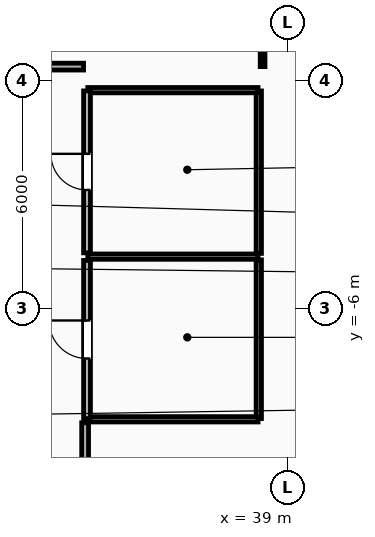
"""IFC4 building model, lengths in metres.
Left out: names, types, materials, properties, quantities, classifications, styles, units other than length and angle.
Written with IfcOpenShell. Run it as: python <this file> out.ifc"""

import sys

from ifc_helpers import new_model, si_unit, direction, frame, frame_2d, origin, place, context, subcontext, project, spatial, rectangle, extrude, element, fill, save


model = new_model("IFC4")
c1 = context("Model", 3, precision=1e-05, world=origin(), true_north=direction((0.0, 1.0)))
c2 = subcontext(c1, "Body", "Model", "MODEL_VIEW")
j1 = project(units=[si_unit("LENGTHUNIT", "METRE"), si_unit("PLANEANGLEUNIT", "RADIAN")], contexts=[c1])
p1 = place(None, origin())
s1 = spatial("IfcSite", under=j1, at=p1, CompositionType="ELEMENT")
p2 = place(p1, origin())
s2 = spatial("IfcBuilding", under=s1, at=p2, CompositionType="ELEMENT")
p3 = place(p2, frame((0.0, 0.0, 231.4)))
s3 = spatial("IfcBuildingStorey", under=s2, at=p3, CompositionType="ELEMENT", Elevation=231.4)
p4 = place(p3, frame((38.24, -8.89, 0.0), z_axis=(0.0, 0.0, 1.0), x_axis=(0.0, 1.0, 0.0)))
e1 = element("IfcWall", 1, at=p4, inside=s3, PredefinedType="PARTITIONING", context=c2, shape_type="SweptSolid", body=[
    extrude(rectangle(XDim=4.175, YDim=0.14, at=frame_2d((2.087, 0.0))), origin(), (0.0, 0.0, 1.0), 3.32),
])
p5 = place(p3, frame((38.24, -4.545, 0.0), z_axis=(0.0, 0.0, 1.0), x_axis=(0.0, 1.0, 0.0)))
e2 = element("IfcWall", 2, at=p5, inside=s3, PredefinedType="PARTITIONING", context=c2, shape_type="SweptSolid", body=[
    extrude(rectangle(XDim=4.275, YDim=0.14, at=frame_2d((2.137, 0.0))), origin(), (0.0, 0.0, 1.0), 3.32),
])
for number, where, z_axis, x_axis in (
    (3, (33.74, -0.25, 0.0), (0.0, 0.0, 1.0), (1.0, 0.0, 0.0)),
    (4, (33.74, -4.63, 0.0), (0.0, 0.0, 1.0), (1.0, 0.0, 0.0)),
    (5, (33.74, -8.91, 0.0), (0.0, 0.0, 1.0), (1.0, 0.0, 0.0)),
):
    element("IfcWall", number, at=place(p3, frame(where, z_axis=z_axis, x_axis=x_axis)), inside=s3, PredefinedType="PARTITIONING", context=c2, shape_type="SweptSolid", body=[
        extrude(rectangle(XDim=4.48, YDim=0.14, at=frame_2d((2.24, 0.0))), origin(), (0.0, 0.0, 1.0), 3.32),
    ])
p6 = place(p3, frame((33.72, -4.53, 0.0), z_axis=(0.0, 0.0, 1.0), x_axis=(0.0, 1.0, 0.0)))
e6 = element("IfcWall", 6, at=p6, inside=s3, PredefinedType="PARTITIONING", context=c2, shape_type="SweptSolid", body=[
    extrude(rectangle(XDim=4.26, YDim=0.18, at=frame_2d((2.13, 0.0))), origin(), (0.0, 0.0, 1.0), 3.32),
])
p7 = place(p6, frame((1.655, 0.0, 0.0)))
e7 = element("IfcOpeningElement", 7, at=p7, cuts=e6, PredefinedType="OPENING", context=c2, shape_type="SweptSolid", body=[
    extrude(rectangle(XDim=0.95, YDim=2.1, at=frame_2d((0.475, 1.05))), frame((0.0, 0.1, 0.0), z_axis=(0.0, -1.0, 0.0), x_axis=(1.0, 0.0, 0.0)), (0.0, 0.0, 1.0), 0.2),
])
p8 = place(p3, frame((33.72, -8.89, 0.0), z_axis=(0.0, 0.0, 1.0), x_axis=(0.0, 1.0, 0.0)))
e8 = element("IfcWall", 8, at=p8, inside=s3, PredefinedType="PARTITIONING", context=c2, shape_type="SweptSolid", body=[
    extrude(rectangle(XDim=4.16, YDim=0.18, at=frame_2d((2.08, 0.0))), origin(), (0.0, 0.0, 1.0), 3.32),
])
p9 = place(p8, frame((1.58, 0.0, 0.0)))
e9 = element("IfcOpeningElement", 9, at=p9, cuts=e8, PredefinedType="OPENING", context=c2, shape_type="SweptSolid", body=[
    extrude(rectangle(XDim=1.0, YDim=2.15, at=frame_2d((0.5, 1.075))), frame((0.0, 0.1, 0.0), z_axis=(0.0, -1.0, 0.0), x_axis=(1.0, 0.0, 0.0)), (0.0, 0.0, 1.0), 0.2),
])
p10 = place(p3, frame((38.34, 0.37, 0.0), z_axis=(0.0, 0.0, 1.0), x_axis=(0.0, 1.0, 0.0)))
e10 = element("IfcWall", 10, at=p10, inside=s3, PredefinedType="PARTITIONING", context=c2, shape_type="SweptSolid", body=[
    extrude(rectangle(XDim=23.885, YDim=0.125, at=frame_2d((11.942, 0.0))), origin(), (0.0, 0.0, 1.0), 3.32),
])
p11 = place(p3, frame((33.628, 0.37, 0.0), z_axis=(0.0, 0.0, 1.0), x_axis=(-1.0, 0.0, 0.0)))
e11 = element("IfcWall", 11, at=p11, inside=s3, PredefinedType="PARTITIONING", context=c2, shape_type="SweptSolid", body=[
    extrude(rectangle(XDim=5.628, YDim=0.18, at=frame_2d((2.814, 0.0))), origin(), (0.0, 0.0, 1.0), 3.32),
])
p12 = place(p3, frame((33.67, -10.3, 0.0), z_axis=(0.0, 0.0, 1.0), x_axis=(0.0, 1.0, 0.0)))
e12 = element("IfcWall", 12, at=p12, inside=s3, PredefinedType="PARTITIONING", context=c2, shape_type="SweptSolid", body=[
    extrude(rectangle(XDim=1.299, YDim=0.18, at=frame_2d((0.649, 0.0))), origin(), (0.0, 0.0, 1.0), 3.32),
])
p13 = place(p7, origin())
e13 = element("IfcDoor", 13, at=p13, inside=s3, OperationType="SINGLE_SWING_RIGHT", PredefinedType="DOOR", context=c2, shape_type="SweptSolid", body=[
    extrude(rectangle(XDim=0.95, YDim=2.1, at=frame_2d((0.475, 1.05))), frame((0.0, 0.025, 0.0), z_axis=(0.0, -1.0, 0.0), x_axis=(1.0, 0.0, 0.0)), (0.0, 0.0, 1.0), 0.05),
])
fill(e7, e13)
p14 = place(p9, origin())
e14 = element("IfcDoor", 14, at=p14, inside=s3, OperationType="SINGLE_SWING_RIGHT", PredefinedType="DOOR", context=c2, shape_type="SweptSolid", body=[
    extrude(rectangle(XDim=1.0, YDim=2.15, at=frame_2d((0.5, 1.075))), frame((0.0, 0.025, 0.0), z_axis=(0.0, -1.0, 0.0), x_axis=(1.0, 0.0, 0.0)), (0.0, 0.0, 1.0), 0.05),
])
fill(e9, e14)
save(model, sys.argv[1])
